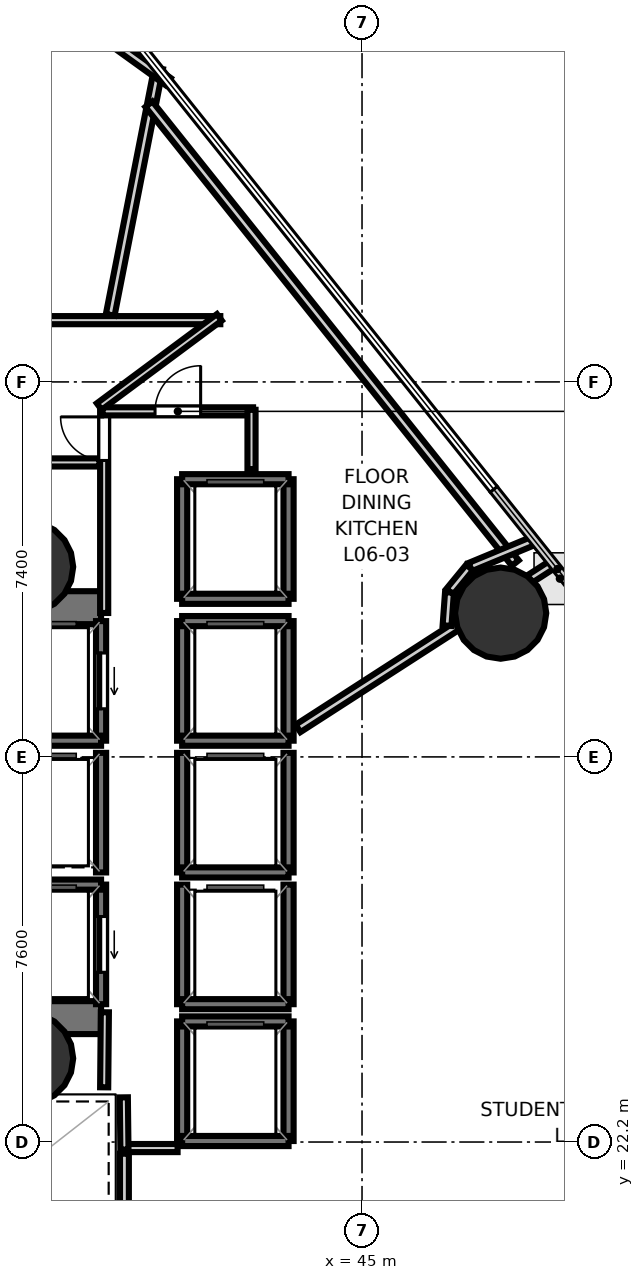
"""IFC4 building model, lengths in metres.
Left out: names, types, materials, properties, quantities, classifications, styles, units other than length and angle.
Written with IfcOpenShell. Run it as: python <this file> out.ifc"""

import sys

from ifc_helpers import new_model, si_unit, direction, frame, frame_2d, origin, origin_2d, place, context, subcontext, project, spatial, rectangle, hollow_circle, extrude, element, fill, save


model = new_model("IFC4")
c1 = context("Model", 3, precision=1e-05, world=origin(), true_north=direction((0.0, 1.0)))
c2 = subcontext(c1, "Body", "Model", "MODEL_VIEW")
j1 = project(units=[si_unit("LENGTHUNIT", "METRE"), si_unit("PLANEANGLEUNIT", "RADIAN")], contexts=[c1])
p1 = place(None, origin())
s1 = spatial("IfcSite", under=j1, at=p1, CompositionType="ELEMENT")
p2 = place(p1, origin())
s2 = spatial("IfcBuilding", under=s1, at=p2, CompositionType="ELEMENT")
p3 = place(p2, frame((0.0, 0.0, 29.4)))
s3 = spatial("IfcBuildingStorey", under=s2, at=p3, CompositionType="ELEMENT", Elevation=29.4)
p4 = place(p3, frame((29.13, 32.745, 0.0), z_axis=(0.0, 0.0, 1.0), x_axis=(1.0, 0.0, 0.0)))
e1 = element("IfcWall", 1, at=p4, inside=s3, PredefinedType="SHEAR", context=c2, shape_type="SweptSolid", body=[
    extrude(rectangle(XDim=10.72, YDim=0.65, at=frame_2d((5.36, 0.0))), origin(), (0.0, 0.0, 1.0), 3.52),
])
p5 = place(p4, frame((1.095, 0.0, 0.0)))
e2 = element("IfcOpeningElement", 2, at=p5, cuts=e1, PredefinedType="OPENING", context=c2, shape_type="SweptSolid", body=[
    extrude(rectangle(XDim=1.25, YDim=2.15, at=frame_2d((0.625, 1.075))), frame((0.0, 0.335, 0.0), z_axis=(0.0, -1.0, 0.0), x_axis=(1.0, 0.0, 0.0)), (0.0, 0.0, 1.0), 0.67),
])
p6 = place(p3, frame((29.13, 24.655, 0.0), z_axis=(0.0, 0.0, 1.0), x_axis=(1.0, 0.0, 0.0)))
e3 = element("IfcWall", 3, at=p6, inside=s3, PredefinedType="SHEAR", context=c2, shape_type="SweptSolid", body=[
    extrude(rectangle(XDim=10.72, YDim=0.65, at=frame_2d((5.36, 0.0))), origin(), (0.0, 0.0, 1.0), 3.52),
])
p7 = place(p6, frame((0.895, 0.0, 0.0)))
e4 = element("IfcOpeningElement", 4, at=p7, cuts=e3, PredefinedType="OPENING", context=c2, shape_type="SweptSolid", body=[
    extrude(rectangle(XDim=1.25, YDim=2.15, at=frame_2d((0.625, 1.075))), frame((0.0, 0.335, 0.0), z_axis=(0.0, -1.0, 0.0), x_axis=(1.0, 0.0, 0.0)), (0.0, 0.0, 1.0), 0.67),
])
for number, where, z_axis, x_axis in (
    (5, (38.4, 33.55, 0.0), (0.0, 0.0, 1.0), (1.0, 0.0, 0.0)),
    (6, (38.4, 23.85, 0.0), (0.0, 0.0, 1.0), (1.0, 0.0, 0.0)),
    (7, (47.736, 32.637, 0.0), (0.0, 0.0, 1.0), (1.0, 0.0, 0.0)),
):
    element("IfcColumn", number, at=place(p3, frame(where, z_axis=z_axis, x_axis=x_axis)), inside=s3, PredefinedType="COLUMN", context=c2, shape_type="SweptSolid", body=[
        extrude(hollow_circle(Radius=0.9, WallThickness=0.045, at=origin_2d()), origin(), (0.0, 0.0, 1.0), 3.7),
    ])
p8 = place(p3, frame((40.147, 44.413, 0.0), z_axis=(0.0, 0.0, 1.0), x_axis=(-0.997124396063, -0.07578217981, 0.0)))
e8 = element("IfcWall", 8, at=p8, inside=s3, PredefinedType="SOLIDWALL", context=c2, shape_type="SweptSolid", body=[
    extrude(rectangle(XDim=13.457, YDim=0.28, at=frame_2d((6.728, 0.0))), origin(), (0.0, 0.0, 1.0), 3.52),
])
p9 = place(p8, frame((3.137, 0.0, 0.85)))
e9 = element("IfcOpeningElement", 9, at=p9, cuts=e8, PredefinedType="OPENING", context=c2, shape_type="SweptSolid", body=[
    extrude(rectangle(XDim=1.8, YDim=2.1, at=frame_2d((0.9, 1.05))), frame((0.0, 0.15, 0.0), z_axis=(0.0, -1.0, 0.0), x_axis=(1.0, 0.0, 0.0)), (0.0, 0.0, 1.0), 0.3),
])
p10 = place(p8, frame((7.56, 0.0, 0.85)))
e10 = element("IfcOpeningElement", 10, at=p10, cuts=e8, PredefinedType="OPENING", context=c2, shape_type="SweptSolid", body=[
    extrude(rectangle(XDim=1.8, YDim=2.1, at=frame_2d((0.9, 1.05))), frame((0.0, 0.15, 0.0), z_axis=(0.0, -1.0, 0.0), x_axis=(1.0, 0.0, 0.0)), (0.0, 0.0, 1.0), 0.3),
])
p11 = place(p3, frame((39.85, 30.12, 0.0), z_axis=(0.0, 0.0, 1.0), x_axis=(0.0, 1.0, 0.0)))
e11 = element("IfcWall", 11, at=p11, inside=s3, PredefinedType="SOLIDWALL", context=c2, shape_type="SweptSolid", body=[
    extrude(rectangle(XDim=2.36, YDim=0.2, at=frame_2d((1.18, 0.0))), origin(), (0.0, 0.0, 1.0), 3.52),
])
p12 = place(p11, frame((0.63, 0.0, 0.0)))
e12 = element("IfcOpeningElement", 12, at=p12, cuts=e11, PredefinedType="OPENING", context=c2, shape_type="SweptSolid", body=[
    extrude(rectangle(XDim=1.1, YDim=2.15, at=frame_2d((0.55, 1.075))), frame((0.0, 0.11, 0.0), z_axis=(0.0, -1.0, 0.0), x_axis=(1.0, 0.0, 0.0)), (0.0, 0.0, 1.0), 0.22),
])
p13 = place(p3, frame((37.75, 30.12, 0.0), z_axis=(0.0, 0.0, 1.0), x_axis=(1.0, 0.0, 0.0)))
e13 = element("IfcWall", 13, at=p13, inside=s3, PredefinedType="SOLIDWALL", context=c2, shape_type="SweptSolid", body=[
    extrude(rectangle(XDim=2.1, YDim=0.2, at=frame_2d((1.05, 0.0))), origin(), (0.0, 0.0, 1.0), 3.52),
])
p14 = place(p3, frame((39.85, 24.92, 0.0), z_axis=(0.0, 0.0, 1.0), x_axis=(0.0, 1.0, 0.0)))
e14 = element("IfcWall", 14, at=p14, inside=s3, PredefinedType="SOLIDWALL", context=c2, shape_type="SweptSolid", body=[
    extrude(rectangle(XDim=2.36, YDim=0.2, at=frame_2d((1.18, 0.0))), origin(), (0.0, 0.0, 1.0), 3.52),
])
p15 = place(p14, frame((0.63, 0.0, 0.0)))
e15 = element("IfcOpeningElement", 15, at=p15, cuts=e14, PredefinedType="OPENING", context=c2, shape_type="SweptSolid", body=[
    extrude(rectangle(XDim=1.1, YDim=2.15, at=frame_2d((0.55, 1.075))), frame((0.0, 0.11, 0.0), z_axis=(0.0, -1.0, 0.0), x_axis=(1.0, 0.0, 0.0)), (0.0, 0.0, 1.0), 0.22),
])
p16 = place(p3, frame((37.75, 27.28, 0.0), z_axis=(0.0, 0.0, 1.0), x_axis=(1.0, 0.0, 0.0)))
e16 = element("IfcWall", 16, at=p16, inside=s3, PredefinedType="SOLIDWALL", context=c2, shape_type="SweptSolid", body=[
    extrude(rectangle(XDim=2.1, YDim=0.2, at=frame_2d((1.05, 0.0))), origin(), (0.0, 0.0, 1.0), 3.52),
])
for number, where, z_axis, x_axis in (
    (17, (43.55, 30.12, 0.0), (0.0, 0.0, 1.0), (0.0, 1.0, 0.0)),
    (18, (41.45, 30.12, 0.0), (0.0, 0.0, 1.0), (0.0, 1.0, 0.0)),
):
    element("IfcWall", number, at=place(p3, frame(where, z_axis=z_axis, x_axis=x_axis)), inside=s3, PredefinedType="SOLIDWALL", context=c2, shape_type="SweptSolid", body=[
        extrude(rectangle(XDim=2.36, YDim=0.2, at=frame_2d((1.18, 0.0))), origin(), (0.0, 0.0, 1.0), 3.52),
    ])
for number, where, z_axis, x_axis in (
    (19, (41.45, 32.48, 0.0), (0.0, 0.0, 1.0), (1.0, 0.0, 0.0)),
    (20, (41.45, 30.12, 0.0), (0.0, 0.0, 1.0), (1.0, 0.0, 0.0)),
):
    element("IfcWall", number, at=place(p3, frame(where, z_axis=z_axis, x_axis=x_axis)), inside=s3, PredefinedType="SOLIDWALL", context=c2, shape_type="SweptSolid", body=[
        extrude(rectangle(XDim=2.1, YDim=0.2, at=frame_2d((1.05, 0.0))), origin(), (0.0, 0.0, 1.0), 3.52),
    ])
for number, where, z_axis, x_axis in (
    (21, (43.55, 27.52, 0.0), (0.0, 0.0, 1.0), (0.0, 1.0, 0.0)),
    (22, (41.45, 27.52, 0.0), (0.0, 0.0, 1.0), (0.0, 1.0, 0.0)),
):
    element("IfcWall", number, at=place(p3, frame(where, z_axis=z_axis, x_axis=x_axis)), inside=s3, PredefinedType="SOLIDWALL", context=c2, shape_type="SweptSolid", body=[
        extrude(rectangle(XDim=2.36, YDim=0.2, at=frame_2d((1.18, 0.0))), origin(), (0.0, 0.0, 1.0), 3.52),
    ])
p17 = place(p3, frame((41.45, 27.52, 0.0), z_axis=(0.0, 0.0, 1.0), x_axis=(1.0, 0.0, 0.0)))
e23 = element("IfcWall", 23, at=p17, inside=s3, PredefinedType="SOLIDWALL", context=c2, shape_type="SweptSolid", body=[
    extrude(rectangle(XDim=2.1, YDim=0.2, at=frame_2d((1.05, 0.0))), origin(), (0.0, 0.0, 1.0), 3.52),
])
for number, where, z_axis, x_axis in (
    (24, (43.55, 24.92, 0.0), (0.0, 0.0, 1.0), (0.0, 1.0, 0.0)),
    (25, (41.45, 24.92, 0.0), (0.0, 0.0, 1.0), (0.0, 1.0, 0.0)),
):
    element("IfcWall", number, at=place(p3, frame(where, z_axis=z_axis, x_axis=x_axis)), inside=s3, PredefinedType="SOLIDWALL", context=c2, shape_type="SweptSolid", body=[
        extrude(rectangle(XDim=2.36, YDim=0.2, at=frame_2d((1.18, 0.0))), origin(), (0.0, 0.0, 1.0), 3.52),
    ])
p18 = place(p3, frame((41.45, 24.92, 0.0), z_axis=(0.0, 0.0, 1.0), x_axis=(1.0, 0.0, 0.0)))
e26 = element("IfcWall", 26, at=p18, inside=s3, PredefinedType="SOLIDWALL", context=c2, shape_type="SweptSolid", body=[
    extrude(rectangle(XDim=2.1, YDim=0.2, at=frame_2d((1.05, 0.0))), origin(), (0.0, 0.0, 1.0), 3.52),
])
p19 = place(p3, frame((39.85, 27.52, 0.0), z_axis=(0.0, 0.0, 1.0), x_axis=(0.0, 1.0, 0.0)))
e27 = element("IfcWall", 27, at=p19, inside=s3, PredefinedType="SOLIDWALL", context=c2, shape_type="SweptSolid", body=[
    extrude(rectangle(XDim=2.36, YDim=0.2, at=frame_2d((1.18, 0.0))), origin(), (0.0, 0.0, 1.0), 3.52),
])
for number, where, z_axis, x_axis in (
    (28, (43.55, 22.22, 0.0), (0.0, 0.0, 1.0), (0.0, 1.0, 0.0)),
    (29, (41.45, 22.22, 0.0), (0.0, 0.0, 1.0), (0.0, 1.0, 0.0)),
):
    element("IfcWall", number, at=place(p3, frame(where, z_axis=z_axis, x_axis=x_axis)), inside=s3, PredefinedType="SOLIDWALL", context=c2, shape_type="SweptSolid", body=[
        extrude(rectangle(XDim=2.36, YDim=0.2, at=frame_2d((1.18, 0.0))), origin(), (0.0, 0.0, 1.0), 3.52),
    ])
for number, where, z_axis, x_axis in (
    (30, (41.45, 24.58, 0.0), (0.0, 0.0, 1.0), (1.0, 0.0, 0.0)),
    (31, (41.45, 22.22, 0.0), (0.0, 0.0, 1.0), (1.0, 0.0, 0.0)),
):
    element("IfcWall", number, at=place(p3, frame(where, z_axis=z_axis, x_axis=x_axis)), inside=s3, PredefinedType="SOLIDWALL", context=c2, shape_type="SweptSolid", body=[
        extrude(rectangle(XDim=2.1, YDim=0.2, at=frame_2d((1.05, 0.0))), origin(), (0.0, 0.0, 1.0), 3.52),
    ])
for number, where, z_axis, x_axis in (
    (32, (43.55, 32.92, 0.0), (0.0, 0.0, 1.0), (0.0, 1.0, 0.0)),
    (33, (41.45, 32.92, 0.0), (0.0, 0.0, 1.0), (0.0, 1.0, 0.0)),
):
    element("IfcWall", number, at=place(p3, frame(where, z_axis=z_axis, x_axis=x_axis)), inside=s3, PredefinedType="SOLIDWALL", context=c2, shape_type="SweptSolid", body=[
        extrude(rectangle(XDim=2.36, YDim=0.2, at=frame_2d((1.18, 0.0))), origin(), (0.0, 0.0, 1.0), 3.52),
    ])
for number, where, z_axis, x_axis in (
    (34, (41.45, 35.28, 0.0), (0.0, 0.0, 1.0), (1.0, 0.0, 0.0)),
    (35, (41.45, 32.92, 0.0), (0.0, 0.0, 1.0), (1.0, 0.0, 0.0)),
):
    element("IfcWall", number, at=place(p3, frame(where, z_axis=z_axis, x_axis=x_axis)), inside=s3, PredefinedType="SOLIDWALL", context=c2, shape_type="SweptSolid", body=[
        extrude(rectangle(XDim=2.1, YDim=0.2, at=frame_2d((1.05, 0.0))), origin(), (0.0, 0.0, 1.0), 3.52),
    ])
p20 = place(p3, frame((39.911, 32.64, 0.0), z_axis=(0.0, 0.0, 1.0), x_axis=(0.0, 1.0, 0.0)))
e36 = element("IfcWall", 36, at=p20, inside=s3, PredefinedType="PARTITIONING", context=c2, shape_type="SweptSolid", body=[
    extrude(rectangle(XDim=4.01, YDim=0.16, at=frame_2d((2.005, 0.0))), origin(), (0.0, 0.0, 1.0), 2.84),
])
p21 = place(p20, frame((3.01, 0.0, 0.0)))
e37 = element("IfcOpeningElement", 37, at=p21, cuts=e36, PredefinedType="OPENING", context=c2, shape_type="SweptSolid", body=[
    extrude(rectangle(XDim=0.86, YDim=2.05, at=frame_2d((0.43, 1.025))), frame((0.0, 0.09, 0.0), z_axis=(0.0, -1.0, 0.0), x_axis=(1.0, 0.0, 0.0)), (0.0, 0.0, 1.0), 0.18),
])
p22 = place(p3, frame((39.88, 36.619, 0.0), z_axis=(0.0, 0.0, 1.0), x_axis=(1.0, 0.0, 0.0)))
e38 = element("IfcWall", 38, at=p22, inside=s3, PredefinedType="PARTITIONING", context=c2, shape_type="SweptSolid", body=[
    extrude(rectangle(XDim=2.97, YDim=0.16, at=frame_2d((1.485, 0.0))), origin(), (0.0, 0.0, 1.0), 2.84),
])
p23 = place(p22, frame((1.035, 0.0, 0.0)))
e39 = element("IfcOpeningElement", 39, at=p23, cuts=e38, PredefinedType="OPENING", context=c2, shape_type="SweptSolid", body=[
    extrude(rectangle(XDim=0.9, YDim=2.1, at=frame_2d((0.45, 1.05))), frame((0.0, 0.09, 0.0), z_axis=(0.0, -1.0, 0.0), x_axis=(1.0, 0.0, 0.0)), (0.0, 0.0, 1.0), 0.18),
])
p24 = place(p3, frame((42.819, 36.65, 0.0), z_axis=(0.0, 0.0, 1.0), x_axis=(0.0, -1.0, 0.0)))
e40 = element("IfcWall", 40, at=p24, inside=s3, PredefinedType="PARTITIONING", context=c2, shape_type="SweptSolid", body=[
    extrude(rectangle(XDim=1.17, YDim=0.16, at=frame_2d((0.585, 0.0))), origin(), (0.0, 0.0, 1.0), 2.84),
])
p25 = place(p3, frame((41.36, 22.081, 0.0), z_axis=(0.0, 0.0, 1.0), x_axis=(-1.0, 0.0, 0.0)))
e41 = element("IfcWall", 41, at=p25, inside=s3, PredefinedType="PARTITIONING", context=c2, shape_type="SweptSolid", body=[
    extrude(rectangle(XDim=1.08, YDim=0.16, at=frame_2d((0.54, 0.0))), origin(), (0.0, 0.0, 1.0), 2.84),
])
p26 = place(p3, frame((40.311, 22.05, 0.0), z_axis=(0.0, 0.0, 1.0), x_axis=(-0.011836292006, 0.999929948642, 0.0)))
e42 = element("IfcWall", 42, at=p26, inside=s3, PredefinedType="PARTITIONING", context=c2, shape_type="SweptSolid", body=[
    extrude(rectangle(XDim=1.031, YDim=0.16, at=frame_2d((0.516, 0.0))), origin(), (0.0, 0.0, 1.0), 2.84),
])
p27 = place(p3, frame((39.911, 23.28, 0.0), z_axis=(0.0, 0.0, 1.0), x_axis=(0.009397771291, 0.999955839972, 0.0)))
e43 = element("IfcWall", 43, at=p27, inside=s3, PredefinedType="PARTITIONING", context=c2, shape_type="SweptSolid", body=[
    extrude(rectangle(XDim=1.481, YDim=0.16, at=frame_2d((0.74, 0.0))), origin(), (0.0, 0.0, 1.0), 2.84),
])
p28 = place(p3, frame((26.42, 38.419, 0.0), z_axis=(0.0, 0.0, 1.0), x_axis=(1.0, 0.0, 0.0)))
e44 = element("IfcWall", 44, at=p28, inside=s3, PredefinedType="PARTITIONING", context=c2, shape_type="SweptSolid", body=[
    extrude(rectangle(XDim=15.783, YDim=0.16, at=frame_2d((7.892, 0.0))), origin(), (0.0, 0.0, 1.0), 2.798),
])
p29 = place(p28, frame((9.246, 0.0, 0.0)))
e45 = element("IfcOpeningElement", 45, at=p29, cuts=e44, PredefinedType="OPENING", context=c2, shape_type="SweptSolid", body=[
    extrude(rectangle(XDim=0.9, YDim=2.1, at=frame_2d((0.45, 1.05))), frame((0.0, 0.09, 0.0), z_axis=(0.0, -1.0, 0.0), x_axis=(1.0, 0.0, 0.0)), (0.0, 0.0, 1.0), 0.18),
])
p30 = place(p28, frame((2.836, 0.0, 0.0)))
e46 = element("IfcOpeningElement", 46, at=p30, cuts=e44, PredefinedType="OPENING", context=c2, shape_type="SweptSolid", body=[
    extrude(rectangle(XDim=0.9, YDim=2.1, at=frame_2d((0.45, 1.05))), frame((0.0, 0.09, 0.0), z_axis=(0.0, -1.0, 0.0), x_axis=(1.0, 0.0, 0.0)), (0.0, 0.0, 1.0), 0.18),
])
p31 = place(p3, frame((42.185, 38.475, 0.0), z_axis=(0.0, 0.0, 1.0), x_axis=(-0.802818467394, -0.596223538961, 0.0)))
e47 = element("IfcWall", 47, at=p31, inside=s3, PredefinedType="PARTITIONING", context=c2, shape_type="SweptSolid", body=[
    extrude(rectangle(XDim=2.953, YDim=0.16, at=frame_2d((1.477, 0.0))), origin(), (0.0, 0.0, 1.0), 2.798),
])
p32 = place(p3, frame((39.818, 35.611, 0.0), z_axis=(0.0, 0.0, 1.0), x_axis=(-1.0, 0.0, 0.0)))
e48 = element("IfcWall", 48, at=p32, inside=s3, PredefinedType="PARTITIONING", context=c2, shape_type="SweptSolid", body=[
    extrude(rectangle(XDim=2.768, YDim=0.16, at=frame_2d((1.384, 0.0))), origin(), (0.0, 0.0, 1.0), 2.84),
])
p33 = place(p3, frame((40.311, 18.0, 0.0), z_axis=(0.0, 0.0, 1.0), x_axis=(0.0, 1.0, 0.0)))
e49 = element("IfcWall", 49, at=p33, inside=s3, PredefinedType="PLUMBINGWALL", context=c2, shape_type="SweptSolid", body=[
    extrude(rectangle(XDim=3.97, YDim=0.175, at=frame_2d((1.985, 0.0))), origin(), (0.0, 0.0, 1.0), 2.84),
])
p34 = place(p3, frame((43.737, 30.362, 0.0), z_axis=(0.0, 0.0, 1.0), x_axis=(0.840502421902, 0.541807787667, 0.0)))
e50 = element("IfcWall", 50, at=p34, inside=s3, PredefinedType="PLUMBINGWALL", context=c2, shape_type="SweptSolid", body=[
    extrude(rectangle(XDim=6.013, YDim=0.175, at=frame_2d((3.007, 0.0))), origin(), (0.0, 0.0, 1.0), 2.798),
])
p35 = place(p3, frame((40.031, 38.524, 0.0), z_axis=(0.0, 0.0, 1.0), x_axis=(0.192440494931, 0.981308644571, 0.0)))
e51 = element("IfcWall", 51, at=p35, inside=s3, PredefinedType="PLUMBINGWALL", context=c2, shape_type="SweptSolid", body=[
    extrude(rectangle(XDim=4.958, YDim=0.175, at=frame_2d((2.479, 0.0))), origin(), (0.0, 0.0, 1.0), 2.798),
])
p36 = place(p3, frame((40.794, 42.681, 0.0), z_axis=(0.0, 0.0, 1.0), x_axis=(0.623977950445, -0.781441947529, 0.0)))
e52 = element("IfcWall", 52, at=p36, inside=s3, PredefinedType="PLUMBINGWALL", context=c2, shape_type="SweptSolid", body=[
    extrude(rectangle(XDim=11.588, YDim=0.175, at=frame_2d((5.794, 0.0))), origin(), (0.0, 0.0, 1.0), 2.84),
])
p37 = place(p3, frame((48.423, 34.08, 0.0), z_axis=(0.0, 0.0, 1.0), x_axis=(-0.923888707417, -0.382661281433, 0.0)))
e53 = element("IfcWall", 53, at=p37, inside=s3, PredefinedType="PLUMBINGWALL", context=c2, shape_type="SweptSolid", body=[
    extrude(rectangle(XDim=1.393, YDim=0.175, at=frame_2d((0.697, 0.0))), origin(), (0.0, 0.0, 1.0), 2.84),
])
p38 = place(p3, frame((47.123, 33.538, 0.0), z_axis=(0.0, 0.0, 1.0), x_axis=(-0.634274060347, -0.773108282436, 0.0)))
e54 = element("IfcWall", 54, at=p38, inside=s3, PredefinedType="PLUMBINGWALL", context=c2, shape_type="SweptSolid", body=[
    extrude(rectangle(XDim=0.615, YDim=0.175, at=frame_2d((0.308, 0.0))), origin(), (0.0, 0.0, 1.0), 2.798),
])
p39 = place(p3, frame((46.726, 33.045, 0.0), z_axis=(0.0, 0.0, 1.0), x_axis=(-0.072993708231, -0.997332401238, 0.0)))
e55 = element("IfcWall", 55, at=p39, inside=s3, PredefinedType="PLUMBINGWALL", context=c2, shape_type="SweptSolid", body=[
    extrude(rectangle(XDim=0.656, YDim=0.175, at=frame_2d((0.328, 0.0))), origin(), (0.0, 0.0, 1.0), 2.84),
])
p40 = place(p3, frame((39.44, 44.376, 0.0), z_axis=(0.0, 0.0, 1.0), x_axis=(0.81138921051, -0.584506243822, 0.0)))
e56 = element("IfcWall", 56, at=p40, inside=s3, PredefinedType="PLUMBINGWALL", context=c2, shape_type="SweptSolid", body=[
    extrude(rectangle(XDim=2.138, YDim=0.175, at=frame_2d((1.069, 0.0))), origin(), (0.0, 0.0, 1.0), 2.84),
])
p41 = place(p12, origin())
e57 = element("IfcDoor", 57, at=p41, inside=s3, OperationType="SLIDING_TO_LEFT", PredefinedType="DOOR", context=c2, shape_type="SweptSolid", body=[
    extrude(rectangle(XDim=1.1, YDim=2.15, at=frame_2d((0.55, 1.075))), frame((0.0, 0.025, 0.0), z_axis=(0.0, -1.0, 0.0), x_axis=(1.0, 0.0, 0.0)), (0.0, 0.0, 1.0), 0.05),
])
fill(e12, e57)
p42 = place(p15, origin())
e58 = element("IfcDoor", 58, at=p42, inside=s3, OperationType="SLIDING_TO_LEFT", PredefinedType="DOOR", context=c2, shape_type="SweptSolid", body=[
    extrude(rectangle(XDim=1.1, YDim=2.15, at=frame_2d((0.55, 1.075))), frame((0.0, 0.025, 0.0), z_axis=(0.0, -1.0, 0.0), x_axis=(1.0, 0.0, 0.0)), (0.0, 0.0, 1.0), 0.05),
])
fill(e15, e58)
p43 = place(p21, origin())
e59 = element("IfcDoor", 59, at=p43, inside=s3, OperationType="SINGLE_SWING_RIGHT", PredefinedType="DOOR", context=c2, shape_type="SweptSolid", body=[
    extrude(rectangle(XDim=0.86, YDim=2.05, at=frame_2d((0.43, 1.025))), frame((0.0, 0.025, 0.0), z_axis=(0.0, -1.0, 0.0), x_axis=(1.0, 0.0, 0.0)), (0.0, 0.0, 1.0), 0.05),
])
fill(e37, e59)
p44 = place(p23, origin())
e60 = element("IfcDoor", 60, at=p44, inside=s3, OperationType="SINGLE_SWING_RIGHT", PredefinedType="DOOR", context=c2, shape_type="SweptSolid", body=[
    extrude(rectangle(XDim=0.9, YDim=2.1, at=frame_2d((0.45, 1.05))), frame((0.0, 0.025, 0.0), z_axis=(0.0, -1.0, 0.0), x_axis=(1.0, 0.0, 0.0)), (0.0, 0.0, 1.0), 0.05),
])
fill(e39, e60)
save(model, sys.argv[1])
